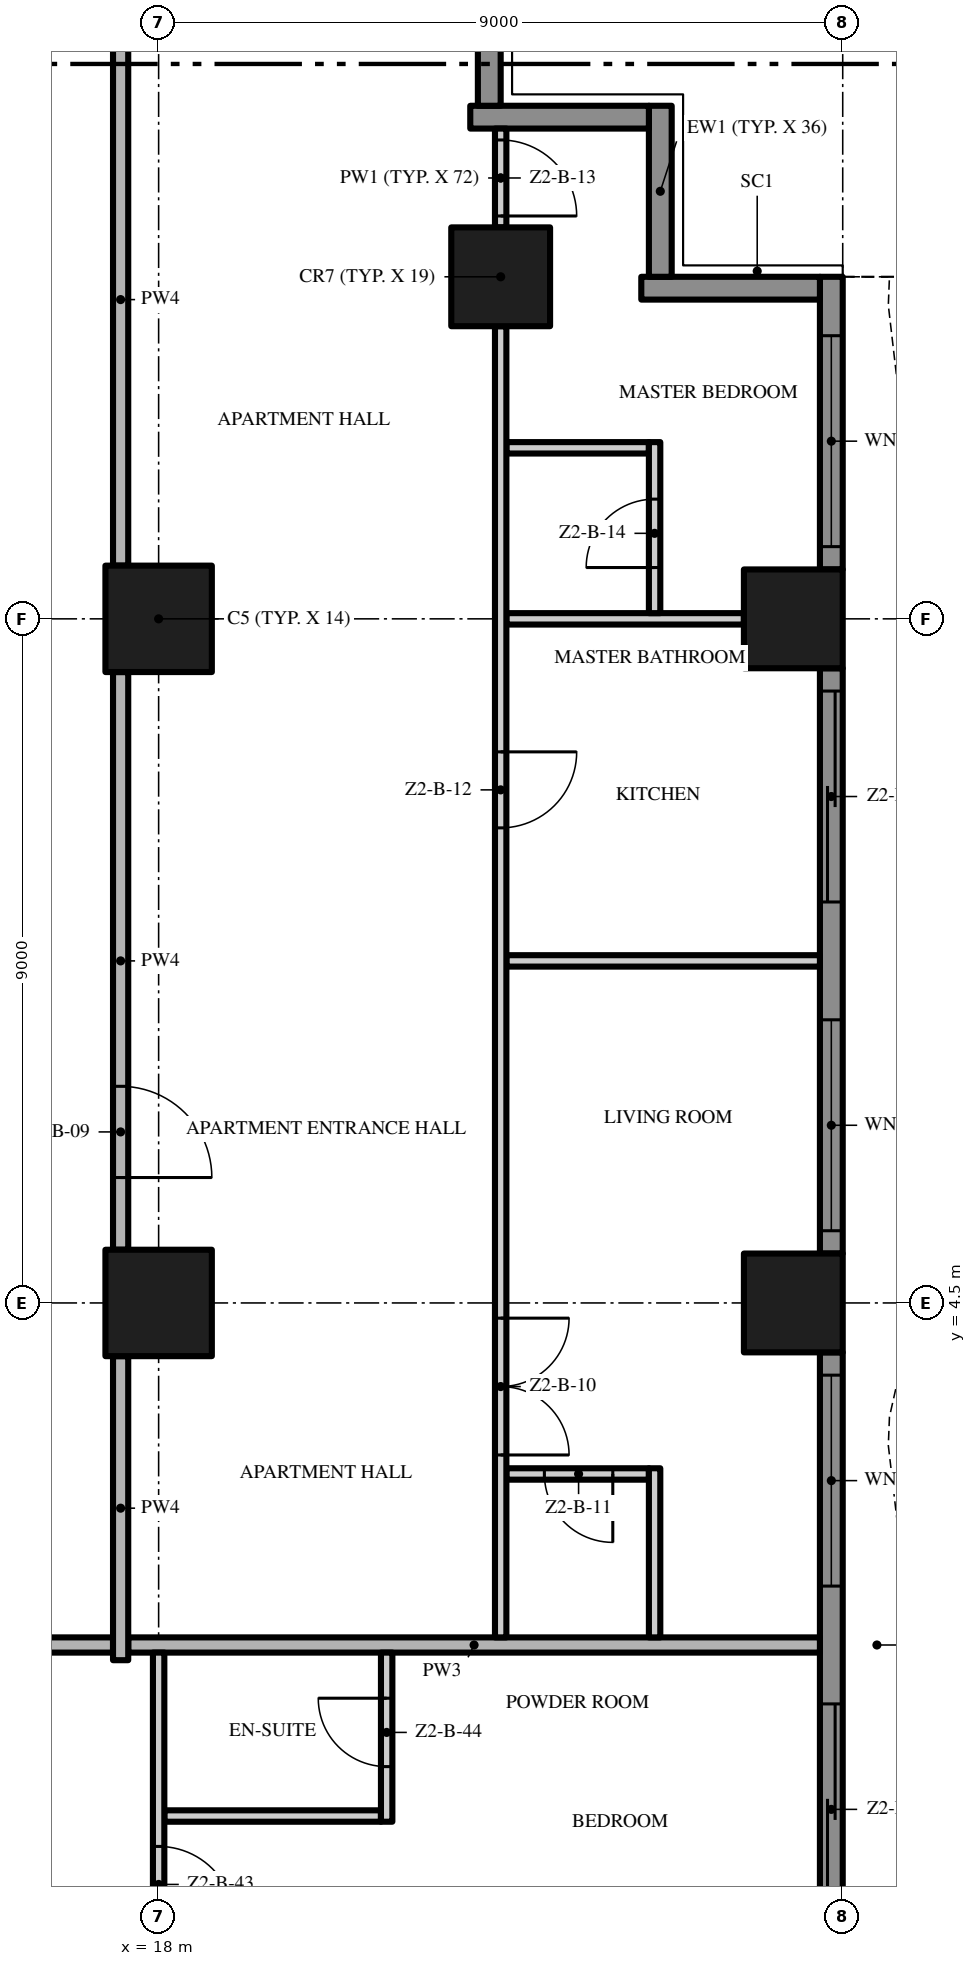
"""IFC4 building model, lengths in metres.
Left out: names, types, materials, properties, quantities, classifications, styles, units other than length and angle.
Written with IfcOpenShell. Run it as: python <this file> out.ifc"""

import sys

from ifc_helpers import new_model, si_unit, direction, frame, frame_2d, origin, origin_2d, place, context, subcontext, project, spatial, polyline, rectangle, outline, extrude, element, fill, save


model = new_model("IFC4")
c1 = context("Model", 3, precision=1e-05, world=origin(), true_north=direction((0.0, 1.0)))
c2 = subcontext(c1, "Body", "Model", "MODEL_VIEW")
j1 = project(units=[si_unit("LENGTHUNIT", "METRE"), si_unit("PLANEANGLEUNIT", "RADIAN")], contexts=[c1])
p1 = place(None, origin())
s1 = spatial("IfcSite", under=j1, at=p1, CompositionType="ELEMENT")
p2 = place(p1, origin())
s2 = spatial("IfcBuilding", under=s1, at=p2, CompositionType="ELEMENT")
p3 = place(p2, frame((0.0, 0.0, 88.4)))
s3 = spatial("IfcBuildingStorey", under=s2, at=p3, CompositionType="ELEMENT", Elevation=88.4)
for number, where, z_axis, x_axis in (
    (1, (18.0, 13.5, 0.0), (0.0, 0.0, 1.0), (1.0, 0.0, 0.0)),
    (2, (18.0, 4.5, 0.0), (0.0, 0.0, 1.0), (1.0, 0.0, 0.0)),
):
    element("IfcColumn", number, at=place(p3, frame(where, z_axis=z_axis, x_axis=x_axis)), inside=s3, PredefinedType="COLUMN", context=c2, shape_type="SweptSolid", body=[
        extrude(rectangle(XDim=1.4, YDim=1.4, at=origin_2d()), origin(), (0.0, 0.0, 1.0), 3.5),
    ])
for number, where, z_axis, x_axis in (
    (3, (26.35, 13.5, 0.0), (0.0, 0.0, 1.0), (1.0, 0.0, 0.0)),
    (4, (22.5, 18.0, 0.0), (0.0, 0.0, 1.0), (1.0, 0.0, 0.0)),
    (5, (26.35, 4.5, 0.0), (0.0, 0.0, 1.0), (1.0, 0.0, 0.0)),
):
    element("IfcColumn", number, at=place(p3, frame(where, z_axis=z_axis, x_axis=x_axis)), inside=s3, PredefinedType="COLUMN", context=c2, shape_type="SweptSolid", body=[
        extrude(rectangle(XDim=1.3, YDim=1.3, at=origin_2d()), origin(), (0.0, 0.0, 1.0), 3.5),
    ])
p4 = place(p3, frame((26.85, 3.85, 0.0), z_axis=(0.0, 0.0, 1.0), x_axis=(0.0, -1.0, 0.0)))
e6 = element("IfcWall", 6, at=p4, inside=s3, PredefinedType="SOLIDWALL", context=c2, shape_type="SweptSolid", body=[
    extrude(rectangle(XDim=7.7, YDim=0.3, at=frame_2d((3.85, 0.0))), origin(), (0.0, 0.0, 1.0), 3.5),
])
p5 = place(p4, frame((4.625, 0.0, 0.0)))
e7 = element("IfcOpeningElement", 7, at=p5, cuts=e6, PredefinedType="OPENING", context=c2, shape_type="SweptSolid", body=[
    extrude(rectangle(XDim=2.775, YDim=2.4, at=frame_2d((1.387, 1.2))), frame((0.0, 0.16, 0.0), z_axis=(0.0, -1.0, 0.0), x_axis=(1.0, 0.0, 0.0)), (0.0, 0.0, 1.0), 0.32),
])
p6 = place(p4, frame((0.3, 0.0, 0.45)))
e8 = element("IfcOpeningElement", 8, at=p6, cuts=e6, PredefinedType="OPENING", context=c2, shape_type="SweptSolid", body=[
    extrude(rectangle(XDim=2.775, YDim=2.65, at=frame_2d((1.387, 1.325))), frame((0.0, 0.16, 0.0), z_axis=(0.0, -1.0, 0.0), x_axis=(1.0, 0.0, 0.0)), (0.0, 0.0, 1.0), 0.32),
])
p7 = place(p3, frame((26.85, 12.85, 0.0), z_axis=(0.0, 0.0, 1.0), x_axis=(0.0, -1.0, 0.0)))
e9 = element("IfcWall", 9, at=p7, inside=s3, PredefinedType="SOLIDWALL", context=c2, shape_type="SweptSolid", body=[
    extrude(rectangle(XDim=7.7, YDim=0.3, at=frame_2d((3.85, 0.0))), origin(), (0.0, 0.0, 1.0), 3.5),
])
p8 = place(p7, frame((4.625, 0.0, 0.45)))
e10 = element("IfcOpeningElement", 10, at=p8, cuts=e9, PredefinedType="OPENING", context=c2, shape_type="SweptSolid", body=[
    extrude(rectangle(XDim=2.775, YDim=2.65, at=frame_2d((1.387, 1.325))), frame((0.0, 0.16, 0.0), z_axis=(0.0, -1.0, 0.0), x_axis=(1.0, 0.0, 0.0)), (0.0, 0.0, 1.0), 0.32),
])
p9 = place(p7, frame((0.3, 0.0, 0.0)))
e11 = element("IfcOpeningElement", 11, at=p9, cuts=e9, PredefinedType="OPENING", context=c2, shape_type="SweptSolid", body=[
    extrude(rectangle(XDim=2.775, YDim=2.4, at=frame_2d((1.387, 1.2))), frame((0.0, 0.16, 0.0), z_axis=(0.0, -1.0, 0.0), x_axis=(1.0, 0.0, 0.0)), (0.0, 0.0, 1.0), 0.32),
])
p10 = place(p3, frame((26.85, 18.0, 0.0), z_axis=(0.0, 0.0, 1.0), x_axis=(0.0, -1.0, 0.0)))
e12 = element("IfcWall", 12, at=p10, inside=s3, PredefinedType="SOLIDWALL", context=c2, shape_type="SweptSolid", body=[
    extrude(rectangle(XDim=3.85, YDim=0.3, at=frame_2d((1.925, 0.0))), origin(), (0.0, 0.0, 1.0), 3.5),
])
p11 = place(p10, frame((0.775, 0.0, 0.45)))
e13 = element("IfcOpeningElement", 13, at=p11, cuts=e12, PredefinedType="OPENING", context=c2, shape_type="SweptSolid", body=[
    extrude(rectangle(XDim=2.775, YDim=2.65, at=frame_2d((1.387, 1.325))), frame((0.0, 0.16, 0.0), z_axis=(0.0, -1.0, 0.0), x_axis=(1.0, 0.0, 0.0)), (0.0, 0.0, 1.0), 0.32),
])
p12 = place(p3, frame((24.35, 17.85, 0.0), z_axis=(0.0, 0.0, 1.0), x_axis=(1.0, 0.0, 0.0)))
e14 = element("IfcWall", 14, at=p12, inside=s3, PredefinedType="SOLIDWALL", context=c2, shape_type="SweptSolid", body=[
    extrude(rectangle(XDim=2.35, YDim=0.3, at=frame_2d((1.175, 0.0))), origin(), (0.0, 0.0, 1.0), 3.5),
])
p13 = place(p3, frame((24.6, 20.25, 0.0), z_axis=(0.0, 0.0, 1.0), x_axis=(0.0, -1.0, 0.0)))
e15 = element("IfcWall", 15, at=p13, inside=s3, PredefinedType="SOLIDWALL", context=c2, shape_type="SweptSolid", body=[
    extrude(rectangle(XDim=2.25, YDim=0.3, at=frame_2d((1.125, 0.0))), origin(), (0.0, 0.0, 1.0), 3.5),
])
p14 = place(p3, frame((22.1, 20.1, 0.0), z_axis=(0.0, 0.0, 1.0), x_axis=(1.0, 0.0, 0.0)))
e16 = element("IfcWall", 16, at=p14, inside=s3, PredefinedType="SOLIDWALL", context=c2, shape_type="SweptSolid", body=[
    extrude(rectangle(XDim=2.35, YDim=0.3, at=frame_2d((1.175, 0.0))), origin(), (0.0, 0.0, 1.0), 3.5),
])
p15 = place(p3, frame((22.35, 22.5, 0.0), z_axis=(0.0, 0.0, 1.0), x_axis=(0.0, -1.0, 0.0)))
e17 = element("IfcWall", 17, at=p15, inside=s3, PredefinedType="SOLIDWALL", context=c2, shape_type="SweptSolid", body=[
    extrude(rectangle(XDim=2.25, YDim=0.3, at=frame_2d((1.125, 0.0))), origin(), (0.0, 0.0, 1.0), 3.5),
])
p16 = place(p3, origin())
e18 = element("IfcWall", 18, at=p16, inside=s3, PredefinedType="USERDEFINED", context=c2, shape_type="SweptSolid", body=[
    extrude(outline(polyline([(29.649, -18.0), (28.988, -16.5), (28.255, -15.0), (27.731, -13.5), (27.6, -12.375), (27.615, -12.0), (27.951, -10.5), (28.612, -9.0), (29.345, -7.5), (29.869, -6.0), (30.0, -4.875), (29.985, -4.5), (29.649, -3.0), (28.988, -1.5), (28.255, 0.0), (27.731, 1.5), (27.6, 2.625), (27.615, 3.0), (27.951, 4.5), (28.612, 6.0), (29.345, 7.5), (29.869, 9.0), (30.0, 10.125), (29.985, 10.5), (29.649, 12.0), (28.988, 13.5), (28.255, 15.0), (27.731, 16.5), (27.6, 17.625), (27.615, 18.0), (27.365, 18.01), (27.349, 17.615), (27.486, 16.444), (28.024, 14.904), (28.761, 13.395), (29.41, 11.921), (29.736, 10.467), (29.749, 10.135), (29.624, 9.056), (29.114, 7.596), (28.385, 6.105), (27.713, 4.579), (27.366, 3.033), (27.349, 2.615), (27.486, 1.444), (28.024, -0.096), (28.761, -1.605), (29.41, -3.079), (29.736, -4.533), (29.749, -4.865), (29.624, -5.944), (29.114, -7.404), (28.385, -8.895), (27.713, -10.421), (27.366, -11.967), (27.349, -12.385), (27.486, -13.556), (28.024, -15.096), (28.761, -16.605), (29.42, -18.101), (29.649, -18.0)])), origin(), (0.0, 0.0, 1.0), 0.9),
])
p17 = place(p3, frame((18.075, -2.25, 0.0), z_axis=(0.0, 0.0, 1.0), x_axis=(1.0, 0.0, 0.0)))
e19 = element("IfcWall", 19, at=p17, inside=s3, PredefinedType="PARTITIONING", context=c2, shape_type="SweptSolid", body=[
    extrude(rectangle(XDim=2.85, YDim=0.15, at=frame_2d((1.425, 0.0))), origin(), (0.0, 0.0, 1.0), 3.5),
])
p18 = place(p3, frame((4.6, 0.0, 0.0), z_axis=(0.0, 0.0, 1.0), x_axis=(1.0, 0.0, 0.0)))
e20 = element("IfcWall", 20, at=p18, inside=s3, PredefinedType="PARTITIONING", context=c2, shape_type="SweptSolid", body=[
    extrude(rectangle(XDim=12.8, YDim=0.2, at=frame_2d((6.4, 0.0))), origin(), (0.0, 0.0, 1.0), 3.5),
])
p19 = place(p3, frame((17.6, 0.0, 0.0), z_axis=(0.0, 0.0, 1.0), x_axis=(1.0, 0.0, 0.0)))
e21 = element("IfcWall", 21, at=p19, inside=s3, PredefinedType="PARTITIONING", context=c2, shape_type="SweptSolid", body=[
    extrude(rectangle(XDim=9.1, YDim=0.2, at=frame_2d((4.55, 0.0))), origin(), (0.0, 0.0, 1.0), 3.5),
])
p20 = place(p3, frame((24.45, 2.25, 0.0), z_axis=(0.0, 0.0, 1.0), x_axis=(-1.0, 0.0, 0.0)))
e22 = element("IfcWall", 22, at=p20, inside=s3, PredefinedType="PARTITIONING", context=c2, shape_type="SweptSolid", body=[
    extrude(rectangle(XDim=1.875, YDim=0.15, at=frame_2d((0.938, 0.0))), origin(), (0.0, 0.0, 1.0), 3.5),
])
p21 = place(p20, frame((0.475, 0.0, 0.0)))
e23 = element("IfcOpeningElement", 23, at=p21, cuts=e22, PredefinedType="OPENING", context=c2, shape_type="SweptSolid", body=[
    extrude(rectangle(XDim=0.9, YDim=2.1, at=frame_2d((0.45, 1.05))), frame((0.0, 0.085, 0.0), z_axis=(0.0, -1.0, 0.0), x_axis=(1.0, 0.0, 0.0)), (0.0, 0.0, 1.0), 0.17),
])
p22 = place(p3, frame((22.575, 9.0, 0.0), z_axis=(0.0, 0.0, 1.0), x_axis=(1.0, 0.0, 0.0)))
e24 = element("IfcWall", 24, at=p22, inside=s3, PredefinedType="PARTITIONING", context=c2, shape_type="SweptSolid", body=[
    extrude(rectangle(XDim=4.125, YDim=0.15, at=frame_2d((2.062, 0.0))), origin(), (0.0, 0.0, 1.0), 3.5),
])
p23 = place(p3, frame((22.575, 13.5, 0.0), z_axis=(0.0, 0.0, 1.0), x_axis=(1.0, 0.0, 0.0)))
e25 = element("IfcWall", 25, at=p23, inside=s3, PredefinedType="PARTITIONING", context=c2, shape_type="SweptSolid", body=[
    extrude(rectangle(XDim=3.125, YDim=0.15, at=frame_2d((1.562, 0.0))), origin(), (0.0, 0.0, 1.0), 3.5),
])
p24 = place(p3, frame((22.575, 15.75, 0.0), z_axis=(0.0, 0.0, 1.0), x_axis=(1.0, 0.0, 0.0)))
e26 = element("IfcWall", 26, at=p24, inside=s3, PredefinedType="PARTITIONING", context=c2, shape_type="SweptSolid", body=[
    extrude(rectangle(XDim=1.875, YDim=0.15, at=frame_2d((0.938, 0.0))), origin(), (0.0, 0.0, 1.0), 3.5),
])
p25 = place(p3, frame((17.5, -0.2, 0.0), z_axis=(0.0, 0.0, 1.0), x_axis=(0.0, 1.0, 0.0)))
e27 = element("IfcWall", 27, at=p25, inside=s3, PredefinedType="PARTITIONING", context=c2, shape_type="SweptSolid", body=[
    extrude(rectangle(XDim=4.0, YDim=0.2, at=frame_2d((2.0, 0.0))), origin(), (0.0, 0.0, 1.0), 3.5),
])
p26 = place(p3, frame((17.5, 12.8, 0.0), z_axis=(0.0, 0.0, 1.0), x_axis=(0.0, -1.0, 0.0)))
e28 = element("IfcWall", 28, at=p26, inside=s3, PredefinedType="PARTITIONING", context=c2, shape_type="SweptSolid", body=[
    extrude(rectangle(XDim=7.6, YDim=0.2, at=frame_2d((3.8, 0.0))), origin(), (0.0, 0.0, 1.0), 3.5),
])
p27 = place(p26, frame((5.45, 0.0, 0.0)))
e29 = element("IfcOpeningElement", 29, at=p27, cuts=e28, PredefinedType="OPENING", context=c2, shape_type="SweptSolid", body=[
    extrude(rectangle(XDim=1.2, YDim=2.4, at=frame_2d((0.6, 1.2))), frame((0.0, 0.11, 0.0), z_axis=(0.0, -1.0, 0.0), x_axis=(1.0, 0.0, 0.0)), (0.0, 0.0, 1.0), 0.22),
])
p28 = place(p3, frame((17.5, 14.2, 0.0), z_axis=(0.0, 0.0, 1.0), x_axis=(0.0, 1.0, 0.0)))
e30 = element("IfcWall", 30, at=p28, inside=s3, PredefinedType="PARTITIONING", context=c2, shape_type="SweptSolid", body=[
    extrude(rectangle(XDim=7.0, YDim=0.2, at=frame_2d((3.5, 0.0))), origin(), (0.0, 0.0, 1.0), 3.5),
])
p29 = place(p3, frame((18.0, -0.1, 0.0), z_axis=(0.0, 0.0, 1.0), x_axis=(0.0, -1.0, 0.0)))
e31 = element("IfcWall", 31, at=p29, inside=s3, PredefinedType="PARTITIONING", context=c2, shape_type="SweptSolid", body=[
    extrude(rectangle(XDim=3.7, YDim=0.15, at=frame_2d((1.85, 0.0))), origin(), (0.0, 0.0, 1.0), 3.5),
])
p30 = place(p29, frame((2.55, 0.0, 0.0)))
e32 = element("IfcOpeningElement", 32, at=p30, cuts=e31, PredefinedType="OPENING", context=c2, shape_type="SweptSolid", body=[
    extrude(rectangle(XDim=1.0, YDim=2.4, at=frame_2d((0.5, 1.2))), frame((0.0, 0.085, 0.0), z_axis=(0.0, -1.0, 0.0), x_axis=(1.0, 0.0, 0.0)), (0.0, 0.0, 1.0), 0.17),
])
p31 = place(p3, frame((21.0, -2.325, 0.0), z_axis=(0.0, 0.0, 1.0), x_axis=(0.0, 1.0, 0.0)))
e33 = element("IfcWall", 33, at=p31, inside=s3, PredefinedType="PARTITIONING", context=c2, shape_type="SweptSolid", body=[
    extrude(rectangle(XDim=2.225, YDim=0.15, at=frame_2d((1.113, 0.0))), origin(), (0.0, 0.0, 1.0), 3.5),
])
p32 = place(p31, frame((0.725, 0.0, 0.0)))
e34 = element("IfcOpeningElement", 34, at=p32, cuts=e33, PredefinedType="OPENING", context=c2, shape_type="SweptSolid", body=[
    extrude(rectangle(XDim=0.9, YDim=2.1, at=frame_2d((0.45, 1.05))), frame((0.0, 0.085, 0.0), z_axis=(0.0, -1.0, 0.0), x_axis=(1.0, 0.0, 0.0)), (0.0, 0.0, 1.0), 0.17),
])
p33 = place(p3, frame((22.5, 17.35, 0.0), z_axis=(0.0, 0.0, 1.0), x_axis=(0.0, -1.0, 0.0)))
e35 = element("IfcWall", 35, at=p33, inside=s3, PredefinedType="PARTITIONING", context=c2, shape_type="SweptSolid", body=[
    extrude(rectangle(XDim=17.25, YDim=0.15, at=frame_2d((8.625, 0.0))), origin(), (0.0, 0.0, 1.0), 3.5),
])
p34 = place(p33, frame((13.05, 0.0, 0.0)))
e36 = element("IfcOpeningElement", 36, at=p34, cuts=e35, PredefinedType="OPENING", context=c2, shape_type="SweptSolid", body=[
    extrude(rectangle(XDim=1.8, YDim=2.4, at=frame_2d((0.9, 1.2))), frame((0.0, 0.085, 0.0), z_axis=(0.0, -1.0, 0.0), x_axis=(1.0, 0.0, 0.0)), (0.0, 0.0, 1.0), 0.17),
])
p35 = place(p33, frame((5.6, 0.0, 0.0)))
e37 = element("IfcOpeningElement", 37, at=p35, cuts=e35, PredefinedType="OPENING", context=c2, shape_type="SweptSolid", body=[
    extrude(rectangle(XDim=1.0, YDim=2.4, at=frame_2d((0.5, 1.2))), frame((0.0, 0.085, 0.0), z_axis=(0.0, -1.0, 0.0), x_axis=(1.0, 0.0, 0.0)), (0.0, 0.0, 1.0), 0.17),
])
p36 = place(p3, frame((22.5, 19.95, 0.0), z_axis=(0.0, 0.0, 1.0), x_axis=(0.0, -1.0, 0.0)))
e38 = element("IfcWall", 38, at=p36, inside=s3, PredefinedType="PARTITIONING", context=c2, shape_type="SweptSolid", body=[
    extrude(rectangle(XDim=1.3, YDim=0.15, at=frame_2d((0.65, 0.0))), origin(), (0.0, 0.0, 1.0), 3.5),
])
p37 = place(p36, frame((0.15, 0.0, 0.0)))
e39 = element("IfcOpeningElement", 39, at=p37, cuts=e38, PredefinedType="OPENING", context=c2, shape_type="SweptSolid", body=[
    extrude(rectangle(XDim=1.0, YDim=2.4, at=frame_2d((0.5, 1.2))), frame((0.0, 0.085, 0.0), z_axis=(0.0, -1.0, 0.0), x_axis=(1.0, 0.0, 0.0)), (0.0, 0.0, 1.0), 0.17),
])
p38 = place(p3, frame((24.525, 0.1, 0.0), z_axis=(0.0, 0.0, 1.0), x_axis=(0.0, 1.0, 0.0)))
e40 = element("IfcWall", 40, at=p38, inside=s3, PredefinedType="PARTITIONING", context=c2, shape_type="SweptSolid", body=[
    extrude(rectangle(XDim=2.225, YDim=0.15, at=frame_2d((1.113, 0.0))), origin(), (0.0, 0.0, 1.0), 3.5),
])
p39 = place(p3, frame((24.525, 13.575, 0.0), z_axis=(0.0, 0.0, 1.0), x_axis=(0.0, 1.0, 0.0)))
e41 = element("IfcWall", 41, at=p39, inside=s3, PredefinedType="PARTITIONING", context=c2, shape_type="SweptSolid", body=[
    extrude(rectangle(XDim=2.25, YDim=0.15, at=frame_2d((1.125, 0.0))), origin(), (0.0, 0.0, 1.0), 3.5),
])
p40 = place(p39, frame((0.6, 0.0, 0.0)))
e42 = element("IfcOpeningElement", 42, at=p40, cuts=e41, PredefinedType="OPENING", context=c2, shape_type="SweptSolid", body=[
    extrude(rectangle(XDim=0.9, YDim=2.1, at=frame_2d((0.45, 1.05))), frame((0.0, 0.085, 0.0), z_axis=(0.0, -1.0, 0.0), x_axis=(1.0, 0.0, 0.0)), (0.0, 0.0, 1.0), 0.17),
])
p41 = place(p5, origin())
e43 = element("IfcDoor", 43, at=p41, inside=s3, OperationType="SINGLE_SWING_LEFT", PredefinedType="DOOR", context=c2, shape_type="SweptSolid", body=[
    extrude(rectangle(XDim=2.775, YDim=2.4, at=frame_2d((1.387, 1.2))), frame((0.0, 0.025, 0.0), z_axis=(0.0, -1.0, 0.0), x_axis=(1.0, 0.0, 0.0)), (0.0, 0.0, 1.0), 0.05),
])
fill(e7, e43)
p42 = place(p6, origin())
e44 = element("IfcWindow", 44, at=p42, inside=s3, PartitioningType="SINGLE_PANEL", PredefinedType="WINDOW", context=c2, shape_type="SweptSolid", body=[
    extrude(rectangle(XDim=2.775, YDim=2.65, at=frame_2d((1.387, 1.325))), frame((0.0, 0.03, 0.0), z_axis=(0.0, -1.0, 0.0), x_axis=(1.0, 0.0, 0.0)), (0.0, 0.0, 1.0), 0.06),
])
fill(e8, e44)
p43 = place(p8, origin())
e45 = element("IfcWindow", 45, at=p43, inside=s3, PartitioningType="SINGLE_PANEL", PredefinedType="WINDOW", context=c2, shape_type="SweptSolid", body=[
    extrude(rectangle(XDim=2.775, YDim=2.65, at=frame_2d((1.387, 1.325))), frame((0.0, 0.03, 0.0), z_axis=(0.0, -1.0, 0.0), x_axis=(1.0, 0.0, 0.0)), (0.0, 0.0, 1.0), 0.06),
])
fill(e10, e45)
p44 = place(p9, origin())
e46 = element("IfcDoor", 46, at=p44, inside=s3, OperationType="SINGLE_SWING_LEFT", PredefinedType="DOOR", context=c2, shape_type="SweptSolid", body=[
    extrude(rectangle(XDim=2.775, YDim=2.4, at=frame_2d((1.387, 1.2))), frame((0.0, 0.025, 0.0), z_axis=(0.0, -1.0, 0.0), x_axis=(1.0, 0.0, 0.0)), (0.0, 0.0, 1.0), 0.05),
])
fill(e11, e46)
p45 = place(p11, origin())
e47 = element("IfcWindow", 47, at=p45, inside=s3, PartitioningType="SINGLE_PANEL", PredefinedType="WINDOW", context=c2, shape_type="SweptSolid", body=[
    extrude(rectangle(XDim=2.775, YDim=2.65, at=frame_2d((1.387, 1.325))), frame((0.0, 0.03, 0.0), z_axis=(0.0, -1.0, 0.0), x_axis=(1.0, 0.0, 0.0)), (0.0, 0.0, 1.0), 0.06),
])
fill(e13, e47)
p46 = place(p27, origin())
e48 = element("IfcDoor", 48, at=p46, inside=s3, OperationType="SINGLE_SWING_RIGHT", PredefinedType="DOOR", context=c2, shape_type="SweptSolid", body=[
    extrude(rectangle(XDim=1.2, YDim=2.4, at=frame_2d((0.6, 1.2))), frame((0.0, 0.025, 0.0), z_axis=(0.0, -1.0, 0.0), x_axis=(1.0, 0.0, 0.0)), (0.0, 0.0, 1.0), 0.05),
])
fill(e29, e48)
p47 = place(p34, origin())
e49 = element("IfcDoor", 49, at=p47, inside=s3, OperationType="DOUBLE_DOOR_SINGLE_SWING", PredefinedType="DOOR", context=c2, shape_type="SweptSolid", body=[
    extrude(rectangle(XDim=1.8, YDim=2.4, at=frame_2d((0.9, 1.2))), frame((0.0, 0.025, 0.0), z_axis=(0.0, -1.0, 0.0), x_axis=(1.0, 0.0, 0.0)), (0.0, 0.0, 1.0), 0.05),
])
fill(e36, e49)
p48 = place(p21, origin())
e50 = element("IfcDoor", 50, at=p48, inside=s3, OperationType="SINGLE_SWING_LEFT", PredefinedType="DOOR", context=c2, shape_type="SweptSolid", body=[
    extrude(rectangle(XDim=0.9, YDim=2.1, at=frame_2d((0.45, 1.05))), frame((0.0, 0.025, 0.0), z_axis=(0.0, -1.0, 0.0), x_axis=(1.0, 0.0, 0.0)), (0.0, 0.0, 1.0), 0.05),
])
fill(e23, e50)
p49 = place(p35, origin())
e51 = element("IfcDoor", 51, at=p49, inside=s3, OperationType="SINGLE_SWING_LEFT", PredefinedType="DOOR", context=c2, shape_type="SweptSolid", body=[
    extrude(rectangle(XDim=1.0, YDim=2.4, at=frame_2d((0.5, 1.2))), frame((0.0, 0.025, 0.0), z_axis=(0.0, -1.0, 0.0), x_axis=(1.0, 0.0, 0.0)), (0.0, 0.0, 1.0), 0.05),
])
fill(e37, e51)
p50 = place(p37, origin())
e52 = element("IfcDoor", 52, at=p50, inside=s3, OperationType="SINGLE_SWING_RIGHT", PredefinedType="DOOR", context=c2, shape_type="SweptSolid", body=[
    extrude(rectangle(XDim=1.0, YDim=2.4, at=frame_2d((0.5, 1.2))), frame((0.0, 0.025, 0.0), z_axis=(0.0, -1.0, 0.0), x_axis=(1.0, 0.0, 0.0)), (0.0, 0.0, 1.0), 0.05),
])
fill(e39, e52)
p51 = place(p40, origin())
e53 = element("IfcDoor", 53, at=p51, inside=s3, OperationType="SINGLE_SWING_LEFT", PredefinedType="DOOR", context=c2, shape_type="SweptSolid", body=[
    extrude(rectangle(XDim=0.9, YDim=2.1, at=frame_2d((0.45, 1.05))), frame((0.0, 0.025, 0.0), z_axis=(0.0, -1.0, 0.0), x_axis=(1.0, 0.0, 0.0)), (0.0, 0.0, 1.0), 0.05),
])
fill(e42, e53)
p52 = place(p30, origin())
e54 = element("IfcDoor", 54, at=p52, inside=s3, OperationType="SINGLE_SWING_RIGHT", PredefinedType="DOOR", context=c2, shape_type="SweptSolid", body=[
    extrude(rectangle(XDim=1.0, YDim=2.4, at=frame_2d((0.5, 1.2))), frame((0.0, 0.025, 0.0), z_axis=(0.0, -1.0, 0.0), x_axis=(1.0, 0.0, 0.0)), (0.0, 0.0, 1.0), 0.05),
])
fill(e32, e54)
p53 = place(p32, origin())
e55 = element("IfcDoor", 55, at=p53, inside=s3, OperationType="SINGLE_SWING_RIGHT", PredefinedType="DOOR", context=c2, shape_type="SweptSolid", body=[
    extrude(rectangle(XDim=0.9, YDim=2.1, at=frame_2d((0.45, 1.05))), frame((0.0, 0.025, 0.0), z_axis=(0.0, -1.0, 0.0), x_axis=(1.0, 0.0, 0.0)), (0.0, 0.0, 1.0), 0.05),
])
fill(e34, e55)
save(model, sys.argv[1])
